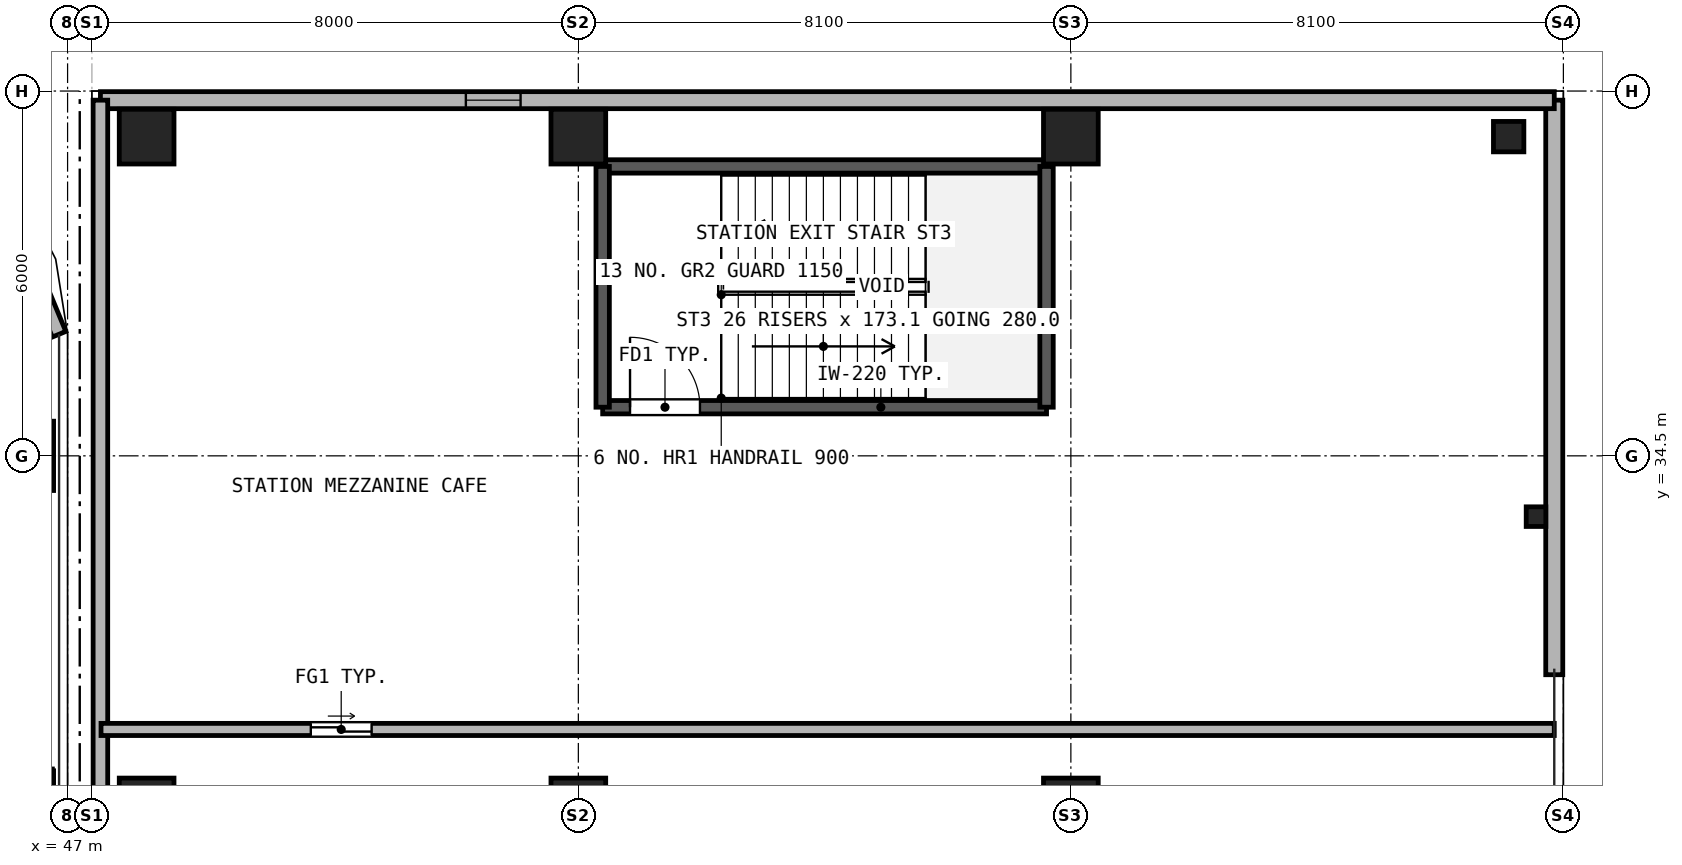
"""IFC4 building model, lengths in metres.
Left out: names, types, materials, properties, quantities, classifications, styles, units other than length and angle.
Written with IfcOpenShell. Run it as: python <this file> out.ifc"""

import sys

from ifc_helpers import new_model, si_unit, direction, frame, frame_2d, origin, origin_2d, place, context, subcontext, project, spatial, rectangle, hollow_rectangle, i_section, extrude, source, transform, mapped, element, fill, save


model = new_model("IFC4")
c1 = context("Model", 3, precision=1e-05, world=origin(), true_north=direction((0.0, 1.0)))
c2 = subcontext(c1, "Body", "Model", "MODEL_VIEW")
j1 = project(units=[si_unit("LENGTHUNIT", "METRE"), si_unit("PLANEANGLEUNIT", "RADIAN")], contexts=[c1])
p1 = place(None, origin())
s1 = spatial("IfcSite", under=j1, at=p1, CompositionType="ELEMENT")
p2 = place(p1, origin())
s2 = spatial("IfcBuilding", under=s1, at=p2, CompositionType="ELEMENT")
p3 = place(p2, frame((0.0, 0.0, 4.5)))
s3 = spatial("IfcBuildingStorey", under=s2, at=p3, CompositionType="ELEMENT", Elevation=4.5)
m1 = source(origin(), c2, "Body", "SweptSolid", [
    extrude(hollow_rectangle(XDim=1.14, YDim=1.14, WallThickness=0.07, at=origin_2d()), origin(), (0.0, 0.0, 1.0), 4.18),
])
for number, where, z_axis, x_axis in (
    (1, (46.2, 28.75, 0.0), (0.0, 0.0, 1.0), (1.0, 0.0, 0.0)),
    (2, (46.2, 34.5, 0.0), (0.0, 0.0, 1.0), (1.0, 0.0, 0.0)),
):
    element("IfcColumn", number, at=place(p3, frame(where, z_axis=z_axis, x_axis=x_axis)), inside=s3, PredefinedType="COLUMN", context=c2, shape_type="MappedRepresentation", body=[
        mapped(m1, transform((0.0, 0.0, 0.0), x_axis=(1.0, 0.0, 0.0), y_axis=(0.0, 1.0, 0.0), z_axis=(0.0, 0.0, 1.0), scale=1.0)),
    ])
m2 = source(origin(), c2, "Body", "SweptSolid", [
    extrude(hollow_rectangle(XDim=0.7, YDim=0.9, WallThickness=0.04, at=origin_2d()), origin(), (0.0, 0.0, 1.0), 4.18),
])
for number, where, z_axis, x_axis in (
    (3, (48.3, 28.75, 0.0), (0.0, 0.0, 1.0), (1.0, 0.0, 0.0)),
    (4, (48.3, 39.75, 0.0), (0.0, 0.0, 1.0), (1.0, 0.0, 0.0)),
    (5, (55.4, 28.75, 0.0), (0.0, 0.0, 1.0), (1.0, 0.0, 0.0)),
    (6, (55.4, 39.75, 0.0), (0.0, 0.0, 1.0), (1.0, 0.0, 0.0)),
    (7, (63.5, 28.75, 0.0), (0.0, 0.0, 1.0), (1.0, 0.0, 0.0)),
    (8, (63.5, 39.75, 0.0), (0.0, 0.0, 1.0), (1.0, 0.0, 0.0)),
):
    element("IfcColumn", number, at=place(p3, frame(where, z_axis=z_axis, x_axis=x_axis)), inside=s3, PredefinedType="COLUMN", context=c2, shape_type="MappedRepresentation", body=[
        mapped(m2, transform((0.0, 0.0, 0.0), x_axis=(1.0, 0.0, 0.0), y_axis=(0.0, 1.0, 0.0), z_axis=(0.0, 0.0, 1.0), scale=1.0)),
    ])
m3 = source(origin(), c2, "Body", "SweptSolid", [
    extrude(hollow_rectangle(XDim=0.5, YDim=0.5, WallThickness=0.025, at=origin_2d()), origin(), (0.0, 0.0, 1.0), 4.18),
])
p4 = place(p3, frame((70.7, 39.75, 0.0), z_axis=(0.0, 0.0, 1.0), x_axis=(1.0, 0.0, 0.0)))
e9 = element("IfcColumn", 9, at=p4, inside=s3, PredefinedType="COLUMN", context=c2, shape_type="MappedRepresentation", body=[
    mapped(m3, transform((0.0, 0.0, 0.0), x_axis=(1.0, 0.0, 0.0), y_axis=(0.0, 1.0, 0.0), z_axis=(0.0, 0.0, 1.0), scale=1.0)),
])
m4 = source(origin(), c2, "Body", "SweptSolid", [
    extrude(i_section(OverallWidth=0.309, OverallDepth=0.323, WebThickness=0.014, FlangeThickness=0.023, at=origin_2d()), origin(), (0.0, 0.0, 1.0), 4.18),
])
p5 = place(p3, frame((71.15, 33.5, 0.0), z_axis=(0.0, 0.0, 1.0), x_axis=(1.0, 0.0, 0.0)))
e10 = element("IfcColumn", 10, at=p5, inside=s3, PredefinedType="PILASTER", context=c2, shape_type="MappedRepresentation", body=[
    mapped(m4, transform((0.0, 0.0, 0.0), x_axis=(1.0, 0.0, 0.0), y_axis=(0.0, 1.0, 0.0), z_axis=(0.0, 0.0, 1.0), scale=1.0)),
])
p6 = place(p3, frame((46.86, 36.5, 0.0), z_axis=(0.0, 0.0, 1.0), x_axis=(-0.382689947836, 0.923876833688, 0.0)))
e11 = element("IfcWall", 11, at=p6, inside=s3, PredefinedType="SOLIDWALL", context=c2, shape_type="SweptSolid", body=[
    extrude(rectangle(XDim=2.954, YDim=0.24, at=frame_2d((1.477, 0.0))), origin(), (0.0, 0.0, 1.0), 4.18),
])
p7 = place(p3, frame((71.45, 30.9, 0.0), z_axis=(0.0, 0.0, 1.0), x_axis=(0.0, 1.0, 0.0)))
e12 = element("IfcWall", 12, at=p7, inside=s3, PredefinedType="SOLIDWALL", context=c2, shape_type="SweptSolid", body=[
    extrude(rectangle(XDim=9.45, YDim=0.28, at=frame_2d((4.725, 0.0))), origin(), (0.0, 0.0, 1.0), 4.18),
])
p8 = place(p3, frame((47.54, 40.35, 0.0), z_axis=(0.0, 0.0, 1.0), x_axis=(1.0, 0.0, 0.0)))
e13 = element("IfcWall", 13, at=p8, inside=s3, PredefinedType="SOLIDWALL", context=c2, shape_type="SweptSolid", body=[
    extrude(rectangle(XDim=23.91, YDim=0.28, at=frame_2d((11.955, 0.0))), origin(), (0.0, 0.0, 1.0), 4.18),
])
p9 = place(p8, frame((6.01, 0.0, 1.1)))
e14 = element("IfcOpeningElement", 14, at=p9, cuts=e13, PredefinedType="OPENING", context=c2, shape_type="SweptSolid", body=[
    extrude(rectangle(XDim=0.9, YDim=1.5, at=frame_2d((0.45, 0.75))), frame((0.0, 0.15, 0.0), z_axis=(0.0, -1.0, 0.0), x_axis=(1.0, 0.0, 0.0)), (0.0, 0.0, 1.0), 0.3),
])
p10 = place(p3, frame((47.54, -0.54, 0.0), z_axis=(0.0, 0.0, 1.0), x_axis=(0.0, 1.0, 0.0)))
e15 = element("IfcWall", 15, at=p10, inside=s3, PredefinedType="SOLIDWALL", context=c2, shape_type="SweptSolid", body=[
    extrude(rectangle(XDim=40.89, YDim=0.24, at=frame_2d((20.445, 0.0))), origin(), (0.0, 0.0, 1.0), 4.18),
])
p11 = place(p3, frame((55.8, 35.3, 0.0), z_axis=(0.0, 0.0, 1.0), x_axis=(1.0, 0.0, 0.0)))
e16 = element("IfcWall", 16, at=p11, inside=s3, PredefinedType="SOLIDWALL", context=c2, shape_type="SweptSolid", body=[
    extrude(rectangle(XDim=7.3, YDim=0.22, at=frame_2d((3.65, 0.0))), origin(), (0.0, 0.0, 1.0), 4.18),
])
p12 = place(p11, frame((0.45, 0.0, 0.0)))
e17 = element("IfcOpeningElement", 17, at=p12, cuts=e16, PredefinedType="OPENING", context=c2, shape_type="SweptSolid", body=[
    extrude(rectangle(XDim=1.15, YDim=2.2, at=frame_2d((0.575, 1.1))), frame((0.0, 0.12, 0.0), z_axis=(0.0, -1.0, 0.0), x_axis=(1.0, 0.0, 0.0)), (0.0, 0.0, 1.0), 0.24),
])
p13 = place(p3, frame((55.8, 39.26, 0.0), z_axis=(0.0, 0.0, 1.0), x_axis=(1.0, 0.0, 0.0)))
e18 = element("IfcWall", 18, at=p13, inside=s3, PredefinedType="SOLIDWALL", context=c2, shape_type="SweptSolid", body=[
    extrude(rectangle(XDim=7.3, YDim=0.22, at=frame_2d((3.65, 0.0))), origin(), (0.0, 0.0, 1.0), 4.18),
])
for number, where, z_axis, x_axis in (
    (19, (55.8, 35.3, 0.0), (0.0, 0.0, 1.0), (0.0, 1.0, 0.0)),
    (20, (63.1, 35.3, 0.0), (0.0, 0.0, 1.0), (0.0, 1.0, 0.0)),
):
    element("IfcWall", number, at=place(p3, frame(where, z_axis=z_axis, x_axis=x_axis)), inside=s3, PredefinedType="SOLIDWALL", context=c2, shape_type="SweptSolid", body=[
        extrude(rectangle(XDim=3.96, YDim=0.22, at=frame_2d((1.98, 0.0))), origin(), (0.0, 0.0, 1.0), 4.18),
    ])
p14 = place(p3, frame((47.55, 30.0, 0.0), z_axis=(0.0, 0.0, 1.0), x_axis=(1.0, 0.0, 0.0)))
e21 = element("IfcWall", 21, at=p14, inside=s3, PredefinedType="PARTITIONING", context=c2, shape_type="SweptSolid", body=[
    extrude(rectangle(XDim=23.9, YDim=0.2, at=frame_2d((11.95, 0.0))), origin(), (0.0, 0.0, 1.0), 4.18),
])
p15 = place(p14, frame((3.45, 0.0, 0.0)))
e22 = element("IfcOpeningElement", 22, at=p15, cuts=e21, PredefinedType="OPENING", context=c2, shape_type="SweptSolid", body=[
    extrude(rectangle(XDim=1.0, YDim=2.1, at=frame_2d((0.5, 1.05))), frame((0.0, 0.11, 0.0), z_axis=(0.0, -1.0, 0.0), x_axis=(1.0, 0.0, 0.0)), (0.0, 0.0, 1.0), 0.22),
])
p16 = place(p9, origin())
e23 = element("IfcWindow", 23, at=p16, inside=s3, PartitioningType="SINGLE_PANEL", PredefinedType="WINDOW", context=c2, shape_type="SweptSolid", body=[
    extrude(rectangle(XDim=0.9, YDim=1.5, at=frame_2d((0.45, 0.75))), frame((0.0, 0.03, 0.0), z_axis=(0.0, -1.0, 0.0), x_axis=(1.0, 0.0, 0.0)), (0.0, 0.0, 1.0), 0.06),
])
fill(e14, e23)
p17 = place(p12, frame((1.15, 0.0, 0.0), z_axis=(0.0, 0.0, 1.0), x_axis=(-1.0, 0.0, 0.0)))
e24 = element("IfcDoor", 24, at=p17, inside=s3, OperationType="SINGLE_SWING_LEFT", PredefinedType="DOOR", context=c2, shape_type="SweptSolid", body=[
    extrude(rectangle(XDim=1.15, YDim=2.2, at=frame_2d((0.575, 1.1))), frame((0.0, 0.025, 0.0), z_axis=(0.0, -1.0, 0.0), x_axis=(1.0, 0.0, 0.0)), (0.0, 0.0, 1.0), 0.05),
])
fill(e17, e24)
p18 = place(p15, origin())
e25 = element("IfcDoor", 25, at=p18, inside=s3, OperationType="DOUBLE_DOOR_SINGLE_SWING", PredefinedType="GATE", context=c2, shape_type="SweptSolid", body=[
    extrude(rectangle(XDim=1.0, YDim=2.1, at=frame_2d((0.5, 1.05))), frame((0.0, 0.025, 0.0), z_axis=(0.0, -1.0, 0.0), x_axis=(1.0, 0.0, 0.0)), (0.0, 0.0, 1.0), 0.05),
])
fill(e22, e25)
save(model, sys.argv[1])
